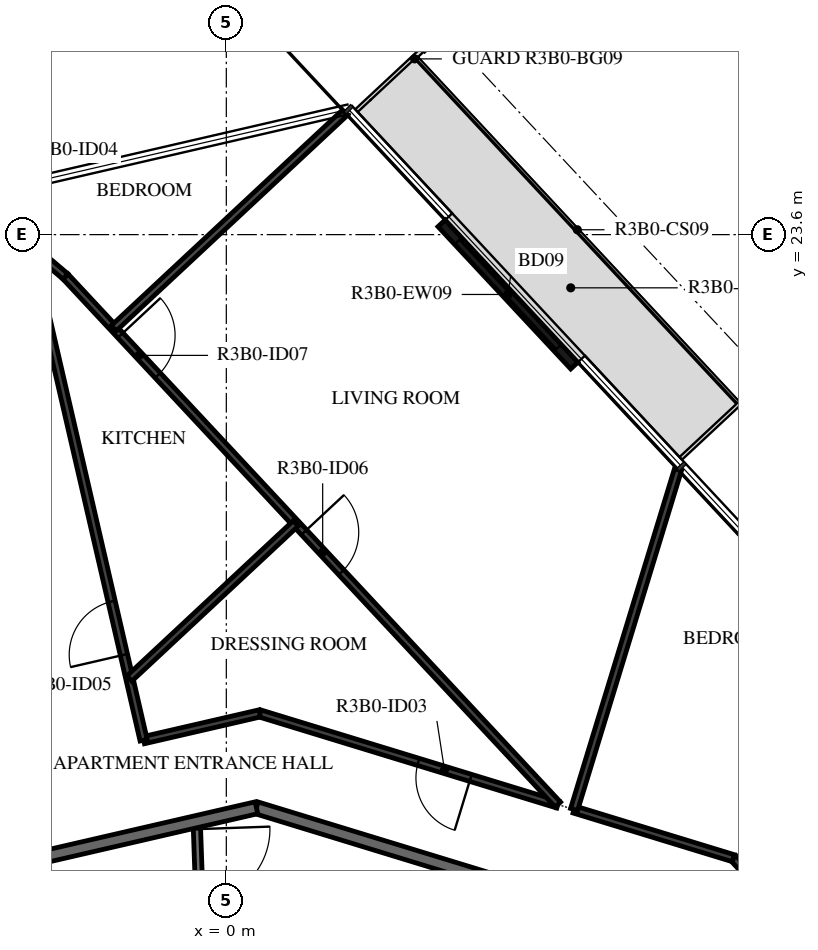
"""IFC4 building model, lengths in metres.
Left out: names, types, materials, properties, quantities, classifications, styles, units other than length and angle.
Written with IfcOpenShell. Run it as: python <this file> out.ifc"""

import sys

from ifc_helpers import new_model, si_unit, direction, frame, frame_2d, origin, place, context, subcontext, project, spatial, rectangle, extrude, element, fill, save


model = new_model("IFC4")
c1 = context("Model", 3, precision=1e-05, world=origin(), true_north=direction((0.0, 1.0)))
c2 = subcontext(c1, "Body", "Model", "MODEL_VIEW")
j1 = project(units=[si_unit("LENGTHUNIT", "METRE"), si_unit("PLANEANGLEUNIT", "RADIAN")], contexts=[c1])
p1 = place(None, origin())
s1 = spatial("IfcSite", under=j1, at=p1, CompositionType="ELEMENT")
p2 = place(p1, origin())
s2 = spatial("IfcBuilding", under=s1, at=p2, CompositionType="ELEMENT")
p3 = place(p2, frame((0.0, 0.0, 127.4)))
s3 = spatial("IfcBuildingStorey", under=s2, at=p3, CompositionType="ELEMENT", Elevation=127.4)
p4 = place(p3, frame((5.722, 21.446, 0.0), z_axis=(0.0, 0.0, 1.0), x_axis=(-0.681994703002, 0.731357111866, 0.0)))
e1 = element("IfcWall", 1, at=p4, inside=s3, PredefinedType="STANDARD", context=c2, shape_type="SweptSolid", body=[
    extrude(rectangle(XDim=3.2, YDim=0.16, at=frame_2d((1.6, 0.0))), origin(), (0.0, 0.0, 1.0), 3.12),
])
p5 = place(p4, frame((0.4, 0.0, 0.0)))
e2 = element("IfcOpeningElement", 2, at=p5, cuts=e1, PredefinedType="OPENING", context=c2, shape_type="SweptSolid", body=[
    extrude(rectangle(XDim=2.4, YDim=2.4, at=frame_2d((1.2, 1.2))), frame((0.0, 0.09, 0.0), z_axis=(0.0, -1.0, 0.0), x_axis=(1.0, 0.0, 0.0)), (0.0, 0.0, 1.0), 0.18),
])
p6 = place(p3, frame((-0.487, 13.948, 0.0), z_axis=(0.0, 0.0, 1.0), x_axis=(0.034859752231, -0.999392214135, 0.0)))
e3 = element("IfcWall", 3, at=p6, inside=s3, PredefinedType="PARTITIONING", context=c2, shape_type="SweptSolid", body=[
    extrude(rectangle(XDim=2.052, YDim=0.12, at=frame_2d((1.026, 0.0))), origin(), (0.0, 0.0, 1.0), 3.12),
])
p7 = place(p6, frame((0.125, 0.0, 0.0)))
e4 = element("IfcOpeningElement", 4, at=p7, cuts=e3, PredefinedType="OPENING", context=c2, shape_type="SweptSolid", body=[
    extrude(rectangle(XDim=1.2, YDim=2.1, at=frame_2d((0.6, 1.05))), frame((0.0, 0.07, 0.0), z_axis=(0.0, -1.0, 0.0), x_axis=(1.0, 0.0, 0.0)), (0.0, 0.0, 1.0), 0.14),
])
p8 = place(p3, frame((7.516, 12.028, 0.0), z_axis=(0.0, 0.0, 1.0), x_axis=(-0.956306642771, 0.292365533182, 0.0)))
e5 = element("IfcWall", 5, at=p8, inside=s3, PredefinedType="STANDARD", context=c2, shape_type="SweptSolid", body=[
    extrude(rectangle(XDim=7.342, YDim=0.2, at=frame_2d((3.671, 0.0))), origin(), (0.0, 0.0, 1.0), 3.12),
])
p9 = place(p3, frame((0.495, 14.175, 0.0), z_axis=(0.0, 0.0, 1.0), x_axis=(-0.974376622151, -0.224922649383, 0.0)))
e6 = element("IfcWall", 6, at=p9, inside=s3, PredefinedType="STANDARD", context=c2, shape_type="SweptSolid", body=[
    extrude(rectangle(XDim=7.342, YDim=0.2, at=frame_2d((3.671, 0.0))), origin(), (0.0, 0.0, 1.0), 3.12),
])
p10 = place(p9, frame((6.142, 0.0, 0.0)))
e7 = element("IfcOpeningElement", 7, at=p10, cuts=e6, PredefinedType="OPENING", context=c2, shape_type="SweptSolid", body=[
    extrude(rectangle(XDim=1.0, YDim=2.1, at=frame_2d((0.5, 1.05))), frame((0.0, 0.11, 0.0), z_axis=(0.0, -1.0, 0.0), x_axis=(1.0, 0.0, 0.0)), (0.0, 0.0, 1.0), 0.22),
])
p11 = place(p3, frame((13.254, 8.075, 0.0), z_axis=(0.0, 0.0, 1.0), x_axis=(-0.681995901471, 0.731355994285, 0.0)))
e8 = element("IfcWall", 8, at=p11, inside=s3, PredefinedType="PARTITIONING", context=c2, shape_type="SweptSolid", body=[
    extrude(rectangle(XDim=7.207, YDim=0.12, at=frame_2d((3.603, 0.0))), origin(), (0.0, 0.0, 1.0), 3.12),
])
p12 = place(p11, frame((4.672, 0.0, 0.0)))
e9 = element("IfcOpeningElement", 9, at=p12, cuts=e8, PredefinedType="OPENING", context=c2, shape_type="SweptSolid", body=[
    extrude(rectangle(XDim=0.9, YDim=2.1, at=frame_2d((0.45, 1.05))), frame((0.0, 0.07, 0.0), z_axis=(0.0, -1.0, 0.0), x_axis=(1.0, 0.0, 0.0)), (0.0, 0.0, 1.0), 0.14),
])
p13 = place(p3, frame((8.339, 13.345, 0.0), z_axis=(0.0, 0.0, 1.0), x_axis=(-0.956324586315, 0.292306834695, 0.0)))
e10 = element("IfcWall", 10, at=p13, inside=s3, PredefinedType="PARTITIONING", context=c2, shape_type="SweptSolid", body=[
    extrude(rectangle(XDim=2.74, YDim=0.12, at=frame_2d((1.37, 0.0))), origin(), (0.0, 0.0, 1.0), 3.12),
])
p14 = place(p3, frame((5.453, 14.228, 0.0), z_axis=(0.0, 0.0, 1.0), x_axis=(-0.95630868333, 0.292358858576, 0.0)))
e11 = element("IfcWall", 11, at=p14, inside=s3, PredefinedType="PARTITIONING", context=c2, shape_type="SweptSolid", body=[
    extrude(rectangle(XDim=5.127, YDim=0.12, at=frame_2d((2.564, 0.0))), origin(), (0.0, 0.0, 1.0), 3.12),
])
p15 = place(p14, frame((1.5, 0.0, 0.0)))
e12 = element("IfcOpeningElement", 12, at=p15, cuts=e11, PredefinedType="OPENING", context=c2, shape_type="SweptSolid", body=[
    extrude(rectangle(XDim=0.9, YDim=2.1, at=frame_2d((0.45, 1.05))), frame((0.0, 0.07, 0.0), z_axis=(0.0, -1.0, 0.0), x_axis=(1.0, 0.0, 0.0)), (0.0, 0.0, 1.0), 0.14),
])
p16 = place(p3, frame((0.549, 15.727, 0.0), z_axis=(0.0, 0.0, 1.0), x_axis=(-0.974374390785, -0.22493231556, 0.0)))
e13 = element("IfcWall", 13, at=p16, inside=s3, PredefinedType="PARTITIONING", context=c2, shape_type="SweptSolid", body=[
    extrude(rectangle(XDim=1.959, YDim=0.12, at=frame_2d((0.979, 0.0))), origin(), (0.0, 0.0, 1.0), 3.12),
])
p17 = place(p3, frame((-1.36, 15.286, 0.0), z_axis=(0.0, 0.0, 1.0), x_axis=(-0.224974943676, 0.97436454919, 0.0)))
e14 = element("IfcWall", 14, at=p17, inside=s3, PredefinedType="PARTITIONING", context=c2, shape_type="SweptSolid", body=[
    extrude(rectangle(XDim=8.341, YDim=0.12, at=frame_2d((4.17, 0.0))), origin(), (0.0, 0.0, 1.0), 3.12),
])
p18 = place(p17, frame((1.441, 0.0, 0.0)))
e15 = element("IfcOpeningElement", 15, at=p18, cuts=e14, PredefinedType="OPENING", context=c2, shape_type="SweptSolid", body=[
    extrude(rectangle(XDim=0.9, YDim=2.1, at=frame_2d((0.45, 1.05))), frame((0.0, 0.07, 0.0), z_axis=(0.0, -1.0, 0.0), x_axis=(1.0, 0.0, 0.0)), (0.0, 0.0, 1.0), 0.14),
])
p19 = place(p3, frame((7.427, 19.734, 0.0), z_axis=(0.0, 0.0, 1.0), x_axis=(-0.292365007065, -0.956306803617, 0.0)))
e16 = element("IfcWall", 16, at=p19, inside=s3, PredefinedType="PARTITIONING", context=c2, shape_type="SweptSolid", body=[
    extrude(rectangle(XDim=5.844, YDim=0.12, at=frame_2d((2.922, 0.0))), origin(), (0.0, 0.0, 1.0), 3.12),
])
p20 = place(p3, frame((-2.646, 22.912, 0.0), z_axis=(0.0, 0.0, 1.0), x_axis=(0.68200318122, -0.731349205788, 0.0)))
e17 = element("IfcWall", 17, at=p20, inside=s3, PredefinedType="PARTITIONING", context=c2, shape_type="SweptSolid", body=[
    extrude(rectangle(XDim=11.874, YDim=0.12, at=frame_2d((5.937, 0.0))), origin(), (0.0, 0.0, 1.0), 3.12),
])
p21 = place(p20, frame((5.752, 0.0, 0.0)))
e18 = element("IfcOpeningElement", 18, at=p21, cuts=e17, PredefinedType="OPENING", context=c2, shape_type="SweptSolid", body=[
    extrude(rectangle(XDim=0.9, YDim=2.1, at=frame_2d((0.45, 1.05))), frame((0.0, 0.07, 0.0), z_axis=(0.0, -1.0, 0.0), x_axis=(1.0, 0.0, 0.0)), (0.0, 0.0, 1.0), 0.14),
])
p22 = place(p20, frame((1.324, 0.0, 0.0)))
e19 = element("IfcOpeningElement", 19, at=p22, cuts=e17, PredefinedType="OPENING", context=c2, shape_type="SweptSolid", body=[
    extrude(rectangle(XDim=0.9, YDim=2.1, at=frame_2d((0.45, 1.05))), frame((0.0, 0.07, 0.0), z_axis=(0.0, -1.0, 0.0), x_axis=(1.0, 0.0, 0.0)), (0.0, 0.0, 1.0), 0.14),
])
p23 = place(p3, frame((1.951, 25.607, 0.0), z_axis=(0.0, 0.0, 1.0), x_axis=(-0.73134872518, -0.682003696601, 0.0)))
e20 = element("IfcWall", 20, at=p23, inside=s3, PredefinedType="PARTITIONING", context=c2, shape_type="SweptSolid", body=[
    extrude(rectangle(XDim=5.2, YDim=0.12, at=frame_2d((2.6, 0.0))), origin(), (0.0, 0.0, 1.0), 2.73),
])
p24 = place(p3, frame((1.141, 18.851, 0.0), z_axis=(0.0, 0.0, 1.0), x_axis=(-0.731352611136, -0.68199952946, 0.0)))
e21 = element("IfcWall", 21, at=p24, inside=s3, PredefinedType="PARTITIONING", context=c2, shape_type="SweptSolid", body=[
    extrude(rectangle(XDim=3.74, YDim=0.12, at=frame_2d((1.87, 0.0))), origin(), (0.0, 0.0, 1.0), 3.12),
])
p25 = place(p3, frame((-3.236, 23.413, 0.0), z_axis=(0.0, 0.0, 1.0), x_axis=(0.762429029489, -0.647071846855, 0.0)))
e22 = element("IfcWall", 22, at=p25, inside=s3, PredefinedType="PARTITIONING", context=c2, shape_type="SweptSolid", body=[
    extrude(rectangle(XDim=0.775, YDim=0.12, at=frame_2d((0.387, 0.0))), origin(), (0.0, 0.0, 1.0), 3.12),
])
p26 = place(p5, origin())
e23 = element("IfcDoor", 23, at=p26, inside=s3, OperationType="DOUBLE_DOOR_SLIDING", PredefinedType="DOOR", context=c2, shape_type="SweptSolid", body=[
    extrude(rectangle(XDim=2.4, YDim=2.4, at=frame_2d((1.2, 1.2))), frame((0.0, 0.025, 0.0), z_axis=(0.0, -1.0, 0.0), x_axis=(1.0, 0.0, 0.0)), (0.0, 0.0, 1.0), 0.05),
])
fill(e2, e23)
p27 = place(p15, origin())
e24 = element("IfcDoor", 24, at=p27, inside=s3, OperationType="SINGLE_SWING_RIGHT", PredefinedType="DOOR", context=c2, shape_type="SweptSolid", body=[
    extrude(rectangle(XDim=0.9, YDim=2.1, at=frame_2d((0.45, 1.05))), frame((0.0, 0.025, 0.0), z_axis=(0.0, -1.0, 0.0), x_axis=(1.0, 0.0, 0.0)), (0.0, 0.0, 1.0), 0.05),
])
fill(e12, e24)
p28 = place(p18, origin())
e25 = element("IfcDoor", 25, at=p28, inside=s3, OperationType="SINGLE_SWING_RIGHT", PredefinedType="DOOR", context=c2, shape_type="SweptSolid", body=[
    extrude(rectangle(XDim=0.9, YDim=2.1, at=frame_2d((0.45, 1.05))), frame((0.0, 0.025, 0.0), z_axis=(0.0, -1.0, 0.0), x_axis=(1.0, 0.0, 0.0)), (0.0, 0.0, 1.0), 0.05),
])
fill(e15, e25)
p29 = place(p21, origin())
e26 = element("IfcDoor", 26, at=p29, inside=s3, OperationType="SINGLE_SWING_RIGHT", PredefinedType="DOOR", context=c2, shape_type="SweptSolid", body=[
    extrude(rectangle(XDim=0.9, YDim=2.1, at=frame_2d((0.45, 1.05))), frame((0.0, 0.025, 0.0), z_axis=(0.0, -1.0, 0.0), x_axis=(1.0, 0.0, 0.0)), (0.0, 0.0, 1.0), 0.05),
])
fill(e18, e26)
p30 = place(p22, origin())
e27 = element("IfcDoor", 27, at=p30, inside=s3, OperationType="SINGLE_SWING_LEFT", PredefinedType="DOOR", context=c2, shape_type="SweptSolid", body=[
    extrude(rectangle(XDim=0.9, YDim=2.1, at=frame_2d((0.45, 1.05))), frame((0.0, 0.025, 0.0), z_axis=(0.0, -1.0, 0.0), x_axis=(1.0, 0.0, 0.0)), (0.0, 0.0, 1.0), 0.05),
])
fill(e19, e27)
p31 = place(p7, origin())
e28 = element("IfcDoor", 28, at=p31, inside=s3, OperationType="DOUBLE_DOOR_SINGLE_SWING", PredefinedType="DOOR", context=c2, shape_type="SweptSolid", body=[
    extrude(rectangle(XDim=1.2, YDim=2.1, at=frame_2d((0.6, 1.05))), frame((0.0, 0.025, 0.0), z_axis=(0.0, -1.0, 0.0), x_axis=(1.0, 0.0, 0.0)), (0.0, 0.0, 1.0), 0.05),
])
fill(e4, e28)
save(model, sys.argv[1])
